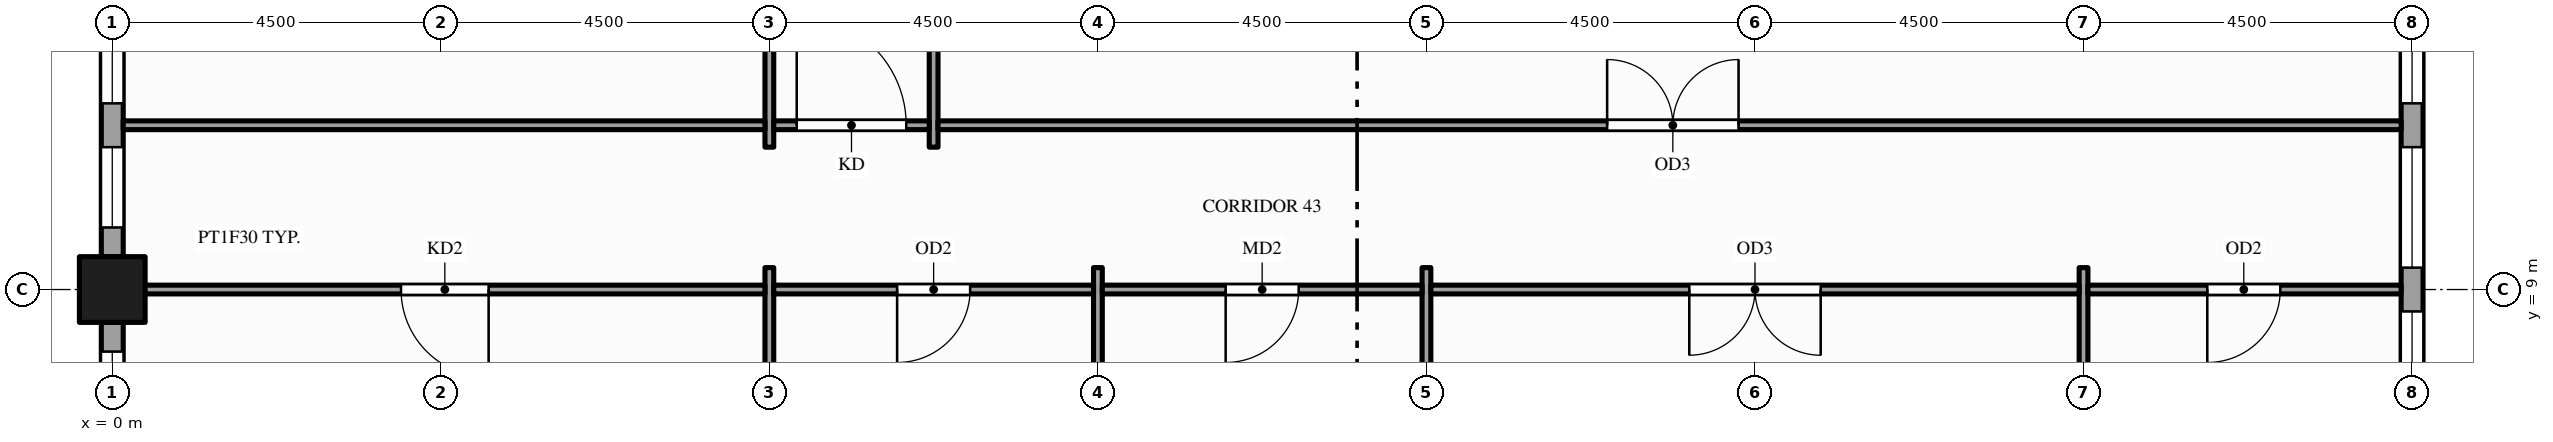
"""IFC4 building model, lengths in metres.
Left out: names, types, materials, properties, quantities, classifications, styles, units other than length and angle.
Written with IfcOpenShell. Run it as: python <this file> out.ifc"""

import sys

from ifc_helpers import new_model, si_unit, direction, frame, frame_2d, origin, origin_2d, place, context, subcontext, project, spatial, rectangle, hollow_rectangle, extrude, element, fill, save


model = new_model("IFC4")
c1 = context("Model", 3, precision=1e-05, world=origin(), true_north=direction((0.0, 1.0)))
c2 = subcontext(c1, "Body", "Model", "MODEL_VIEW")
j1 = project(units=[si_unit("LENGTHUNIT", "METRE"), si_unit("PLANEANGLEUNIT", "RADIAN")], contexts=[c1])
p1 = place(None, origin())
s1 = spatial("IfcSite", under=j1, at=p1, CompositionType="ELEMENT")
p2 = place(p1, origin())
s2 = spatial("IfcBuilding", under=s1, at=p2, CompositionType="ELEMENT")
p3 = place(p2, frame((0.0, 0.0, 139.0)))
s3 = spatial("IfcBuildingStorey", under=s2, at=p3, CompositionType="ELEMENT", Elevation=139.0)
p4 = place(p3, frame((0.0, 9.0, -0.15), z_axis=(0.0, 0.0, 1.0), x_axis=(1.0, 0.0, 0.0)))
e1 = element("IfcColumn", 1, at=p4, inside=s3, PredefinedType="COLUMN", context=c2, shape_type="SweptSolid", body=[
    extrude(hollow_rectangle(XDim=0.9, YDim=0.9, WallThickness=0.045, at=origin_2d()), origin(), (0.0, 0.0, 1.0), 4.0),
])
p5 = place(p3, frame((0.0, 13.05, 0.0), z_axis=(0.0, 0.0, 1.0), x_axis=(0.0, -1.0, 0.0)))
e2 = element("IfcWall", 2, at=p5, inside=s3, PredefinedType="STANDARD", context=c2, shape_type="SweptSolid", body=[
    extrude(rectangle(XDim=3.6, YDim=0.3, at=frame_2d((1.8, 0.0))), origin(), (0.0, 0.0, 1.0), 3.149),
])
p6 = place(p5, frame((0.4, 0.0, 0.9)))
e3 = element("IfcOpeningElement", 3, at=p6, cuts=e2, PredefinedType="OPENING", context=c2, shape_type="SweptSolid", body=[
    extrude(rectangle(XDim=1.1, YDim=2.0, at=frame_2d((0.55, 1.0))), frame((0.0, 0.16, 0.0), z_axis=(0.0, -1.0, 0.0), x_axis=(1.0, 0.0, 0.0)), (0.0, 0.0, 1.0), 0.32),
])
p7 = place(p5, frame((2.1, 0.0, 0.9)))
e4 = element("IfcOpeningElement", 4, at=p7, cuts=e2, PredefinedType="OPENING", context=c2, shape_type="SweptSolid", body=[
    extrude(rectangle(XDim=1.1, YDim=2.0, at=frame_2d((0.55, 1.0))), frame((0.0, 0.16, 0.0), z_axis=(0.0, -1.0, 0.0), x_axis=(1.0, 0.0, 0.0)), (0.0, 0.0, 1.0), 0.32),
])
p8 = place(p3, frame((0.0, 8.55, 0.0), z_axis=(0.0, 0.0, 1.0), x_axis=(0.0, -1.0, 0.0)))
e5 = element("IfcWall", 5, at=p8, inside=s3, PredefinedType="STANDARD", context=c2, shape_type="SweptSolid", body=[
    extrude(rectangle(XDim=3.6, YDim=0.3, at=frame_2d((1.8, 0.0))), origin(), (0.0, 0.0, 1.0), 3.149),
])
p9 = place(p8, frame((0.4, 0.0, 0.9)))
e6 = element("IfcOpeningElement", 6, at=p9, cuts=e5, PredefinedType="OPENING", context=c2, shape_type="SweptSolid", body=[
    extrude(rectangle(XDim=1.1, YDim=2.0, at=frame_2d((0.55, 1.0))), frame((0.0, 0.16, 0.0), z_axis=(0.0, -1.0, 0.0), x_axis=(1.0, 0.0, 0.0)), (0.0, 0.0, 1.0), 0.32),
])
p10 = place(p8, frame((2.1, 0.0, 0.9)))
e7 = element("IfcOpeningElement", 7, at=p10, cuts=e5, PredefinedType="OPENING", context=c2, shape_type="SweptSolid", body=[
    extrude(rectangle(XDim=1.1, YDim=2.0, at=frame_2d((0.55, 1.0))), frame((0.0, 0.16, 0.0), z_axis=(0.0, -1.0, 0.0), x_axis=(1.0, 0.0, 0.0)), (0.0, 0.0, 1.0), 0.32),
])
p11 = place(p3, frame((31.5, 1.95, 0.0), z_axis=(0.0, 0.0, 1.0), x_axis=(0.0, 1.0, 0.0)))
e8 = element("IfcWall", 8, at=p11, inside=s3, PredefinedType="STANDARD", context=c2, shape_type="SweptSolid", body=[
    extrude(rectangle(XDim=21.6, YDim=0.3, at=frame_2d((10.8, 0.0))), origin(), (0.0, 0.0, 1.0), 3.149),
])
p12 = place(p11, frame((0.6, 0.0, 0.9)))
e9 = element("IfcOpeningElement", 9, at=p12, cuts=e8, PredefinedType="OPENING", context=c2, shape_type="SweptSolid", body=[
    extrude(rectangle(XDim=1.65, YDim=2.0, at=frame_2d((0.825, 1.0))), frame((0.0, 0.16, 0.0), z_axis=(0.0, -1.0, 0.0), x_axis=(1.0, 0.0, 0.0)), (0.0, 0.0, 1.0), 0.32),
])
p13 = place(p11, frame((2.85, 0.0, 0.9)))
e10 = element("IfcOpeningElement", 10, at=p13, cuts=e8, PredefinedType="OPENING", context=c2, shape_type="SweptSolid", body=[
    extrude(rectangle(XDim=1.65, YDim=2.0, at=frame_2d((0.825, 1.0))), frame((0.0, 0.16, 0.0), z_axis=(0.0, -1.0, 0.0), x_axis=(1.0, 0.0, 0.0)), (0.0, 0.0, 1.0), 0.32),
])
p14 = place(p11, frame((5.1, 0.0, 0.9)))
e11 = element("IfcOpeningElement", 11, at=p14, cuts=e8, PredefinedType="OPENING", context=c2, shape_type="SweptSolid", body=[
    extrude(rectangle(XDim=1.65, YDim=2.0, at=frame_2d((0.825, 1.0))), frame((0.0, 0.16, 0.0), z_axis=(0.0, -1.0, 0.0), x_axis=(1.0, 0.0, 0.0)), (0.0, 0.0, 1.0), 0.32),
])
p15 = place(p11, frame((7.35, 0.0, 0.9)))
e12 = element("IfcOpeningElement", 12, at=p15, cuts=e8, PredefinedType="OPENING", context=c2, shape_type="SweptSolid", body=[
    extrude(rectangle(XDim=1.65, YDim=2.0, at=frame_2d((0.825, 1.0))), frame((0.0, 0.16, 0.0), z_axis=(0.0, -1.0, 0.0), x_axis=(1.0, 0.0, 0.0)), (0.0, 0.0, 1.0), 0.32),
])
p16 = place(p11, frame((9.6, 0.0, 0.9)))
e13 = element("IfcOpeningElement", 13, at=p16, cuts=e8, PredefinedType="OPENING", context=c2, shape_type="SweptSolid", body=[
    extrude(rectangle(XDim=1.65, YDim=2.0, at=frame_2d((0.825, 1.0))), frame((0.0, 0.16, 0.0), z_axis=(0.0, -1.0, 0.0), x_axis=(1.0, 0.0, 0.0)), (0.0, 0.0, 1.0), 0.32),
])
p17 = place(p11, frame((11.85, 0.0, 0.9)))
e14 = element("IfcOpeningElement", 14, at=p17, cuts=e8, PredefinedType="OPENING", context=c2, shape_type="SweptSolid", body=[
    extrude(rectangle(XDim=1.65, YDim=2.0, at=frame_2d((0.825, 1.0))), frame((0.0, 0.16, 0.0), z_axis=(0.0, -1.0, 0.0), x_axis=(1.0, 0.0, 0.0)), (0.0, 0.0, 1.0), 0.32),
])
p18 = place(p11, frame((14.1, 0.0, 0.9)))
e15 = element("IfcOpeningElement", 15, at=p18, cuts=e8, PredefinedType="OPENING", context=c2, shape_type="SweptSolid", body=[
    extrude(rectangle(XDim=1.65, YDim=2.0, at=frame_2d((0.825, 1.0))), frame((0.0, 0.16, 0.0), z_axis=(0.0, -1.0, 0.0), x_axis=(1.0, 0.0, 0.0)), (0.0, 0.0, 1.0), 0.32),
])
p19 = place(p11, frame((16.35, 0.0, 0.9)))
e16 = element("IfcOpeningElement", 16, at=p19, cuts=e8, PredefinedType="OPENING", context=c2, shape_type="SweptSolid", body=[
    extrude(rectangle(XDim=1.65, YDim=2.0, at=frame_2d((0.825, 1.0))), frame((0.0, 0.16, 0.0), z_axis=(0.0, -1.0, 0.0), x_axis=(1.0, 0.0, 0.0)), (0.0, 0.0, 1.0), 0.32),
])
p20 = place(p11, frame((18.6, 0.0, 0.9)))
e17 = element("IfcOpeningElement", 17, at=p20, cuts=e8, PredefinedType="OPENING", context=c2, shape_type="SweptSolid", body=[
    extrude(rectangle(XDim=1.65, YDim=2.0, at=frame_2d((0.825, 1.0))), frame((0.0, 0.16, 0.0), z_axis=(0.0, -1.0, 0.0), x_axis=(1.0, 0.0, 0.0)), (0.0, 0.0, 1.0), 0.32),
])
p21 = place(p3, frame((9.0, 3.875, 0.0), z_axis=(0.0, 0.0, 1.0), x_axis=(0.0, 1.0, 0.0)))
e18 = element("IfcWall", 18, at=p21, inside=s3, PredefinedType="PARTITIONING", context=c2, shape_type="SweptSolid", body=[
    extrude(rectangle(XDim=5.425, YDim=0.12, at=frame_2d((2.712, 0.0))), origin(), (0.0, 0.0, 1.0), 2.87),
])
p22 = place(p3, frame((9.0, 10.95, 0.0), z_axis=(0.0, 0.0, 1.0), x_axis=(0.0, 1.0, 0.0)))
e19 = element("IfcWall", 19, at=p22, inside=s3, PredefinedType="PARTITIONING", context=c2, shape_type="SweptSolid", body=[
    extrude(rectangle(XDim=20.85, YDim=0.12, at=frame_2d((10.425, 0.0))), origin(), (0.0, 0.0, 1.0), 2.6),
])
p23 = place(p22, frame((2.05, 0.0, 0.0)))
e20 = element("IfcOpeningElement", 20, at=p23, cuts=e19, PredefinedType="OPENING", context=c2, shape_type="SweptSolid", body=[
    extrude(rectangle(XDim=1.0, YDim=2.1, at=frame_2d((0.5, 1.05))), frame((0.0, 0.07, 0.0), z_axis=(0.0, -1.0, 0.0), x_axis=(1.0, 0.0, 0.0)), (0.0, 0.0, 1.0), 0.14),
])
p24 = place(p22, frame((6.55, 0.0, 0.0)))
e21 = element("IfcOpeningElement", 21, at=p24, cuts=e19, PredefinedType="OPENING", context=c2, shape_type="SweptSolid", body=[
    extrude(rectangle(XDim=1.0, YDim=2.1, at=frame_2d((0.5, 1.05))), frame((0.0, 0.07, 0.0), z_axis=(0.0, -1.0, 0.0), x_axis=(1.0, 0.0, 0.0)), (0.0, 0.0, 1.0), 0.14),
])
p25 = place(p22, frame((11.805, 0.0, 0.0)))
e22 = element("IfcOpeningElement", 22, at=p25, cuts=e19, PredefinedType="OPENING", context=c2, shape_type="SweptSolid", body=[
    extrude(rectangle(XDim=1.8, YDim=2.1, at=frame_2d((0.9, 1.05))), frame((0.0, 0.07, 0.0), z_axis=(0.0, -1.0, 0.0), x_axis=(1.0, 0.0, 0.0)), (0.0, 0.0, 1.0), 0.14),
])
p26 = place(p3, frame((11.25, 10.95, 0.0), z_axis=(0.0, 0.0, 1.0), x_axis=(0.0, 1.0, 0.0)))
e23 = element("IfcWall", 23, at=p26, inside=s3, PredefinedType="PARTITIONING", context=c2, shape_type="SweptSolid", body=[
    extrude(rectangle(XDim=20.85, YDim=0.12, at=frame_2d((10.425, 0.0))), origin(), (0.0, 0.0, 1.0), 2.6),
])
p27 = place(p26, frame((17.8, 0.0, 0.0)))
e24 = element("IfcOpeningElement", 24, at=p27, cuts=e23, PredefinedType="OPENING", context=c2, shape_type="SweptSolid", body=[
    extrude(rectangle(XDim=1.0, YDim=2.1, at=frame_2d((0.5, 1.05))), frame((0.0, 0.07, 0.0), z_axis=(0.0, -1.0, 0.0), x_axis=(1.0, 0.0, 0.0)), (0.0, 0.0, 1.0), 0.14),
])
p28 = place(p26, frame((4.2, 0.0, 0.0)))
e25 = element("IfcOpeningElement", 25, at=p28, cuts=e23, PredefinedType="OPENING", context=c2, shape_type="SweptSolid", body=[
    extrude(rectangle(XDim=1.2, YDim=2.1, at=frame_2d((0.6, 1.05))), frame((0.0, 0.07, 0.0), z_axis=(0.0, -1.0, 0.0), x_axis=(1.0, 0.0, 0.0)), (0.0, 0.0, 1.0), 0.14),
])
for number, where, z_axis, x_axis in (
    (26, (13.5, 0.15, 0.0), (0.0, 0.0, 1.0), (0.0, 1.0, 0.0)),
    (27, (18.0, 0.15, 0.0), (0.0, 0.0, 1.0), (0.0, 1.0, 0.0)),
):
    element("IfcWall", number, at=place(p3, frame(where, z_axis=z_axis, x_axis=x_axis)), inside=s3, PredefinedType="PARTITIONING", context=c2, shape_type="SweptSolid", body=[
        extrude(rectangle(XDim=9.15, YDim=0.12, at=frame_2d((4.575, 0.0))), origin(), (0.0, 0.0, 1.0), 2.87),
    ])
p29 = place(p3, frame((27.0, 1.65, 0.0), z_axis=(0.0, 0.0, 1.0), x_axis=(0.0, 1.0, 0.0)))
e28 = element("IfcWall", 28, at=p29, inside=s3, PredefinedType="PARTITIONING", context=c2, shape_type="SweptSolid", body=[
    extrude(rectangle(XDim=7.65, YDim=0.12, at=frame_2d((3.825, 0.0))), origin(), (0.0, 0.0, 1.0), 2.87),
])
p30 = place(p3, frame((0.15, 9.0, 0.0), z_axis=(0.0, 0.0, 1.0), x_axis=(1.0, 0.0, 0.0)))
e29 = element("IfcWall", 29, at=p30, inside=s3, PredefinedType="PARTITIONING", context=c2, shape_type="SweptSolid", body=[
    extrude(rectangle(XDim=8.79, YDim=0.12, at=frame_2d((4.395, 0.0))), origin(), (0.0, 0.0, 1.0), 2.87),
])
p31 = place(p30, frame((3.805, 0.0, 0.0)))
e30 = element("IfcOpeningElement", 30, at=p31, cuts=e29, PredefinedType="OPENING", context=c2, shape_type="SweptSolid", body=[
    extrude(rectangle(XDim=1.2, YDim=2.1, at=frame_2d((0.6, 1.05))), frame((0.0, 0.07, 0.0), z_axis=(0.0, -1.0, 0.0), x_axis=(1.0, 0.0, 0.0)), (0.0, 0.0, 1.0), 0.14),
])
p32 = place(p3, frame((9.06, 9.0, 0.0), z_axis=(0.0, 0.0, 1.0), x_axis=(1.0, 0.0, 0.0)))
e31 = element("IfcWall", 31, at=p32, inside=s3, PredefinedType="PARTITIONING", context=c2, shape_type="SweptSolid", body=[
    extrude(rectangle(XDim=4.38, YDim=0.12, at=frame_2d((2.19, 0.0))), origin(), (0.0, 0.0, 1.0), 2.87),
])
p33 = place(p32, frame((1.69, 0.0, 0.0)))
e32 = element("IfcOpeningElement", 32, at=p33, cuts=e31, PredefinedType="OPENING", context=c2, shape_type="SweptSolid", body=[
    extrude(rectangle(XDim=1.0, YDim=2.1, at=frame_2d((0.5, 1.05))), frame((0.0, 0.07, 0.0), z_axis=(0.0, -1.0, 0.0), x_axis=(1.0, 0.0, 0.0)), (0.0, 0.0, 1.0), 0.14),
])
p34 = place(p3, frame((13.56, 9.0, 0.0), z_axis=(0.0, 0.0, 1.0), x_axis=(1.0, 0.0, 0.0)))
e33 = element("IfcWall", 33, at=p34, inside=s3, PredefinedType="PARTITIONING", context=c2, shape_type="SweptSolid", body=[
    extrude(rectangle(XDim=4.38, YDim=0.12, at=frame_2d((2.19, 0.0))), origin(), (0.0, 0.0, 1.0), 2.87),
])
p35 = place(p34, frame((1.69, 0.0, 0.0)))
e34 = element("IfcOpeningElement", 34, at=p35, cuts=e33, PredefinedType="OPENING", context=c2, shape_type="SweptSolid", body=[
    extrude(rectangle(XDim=1.0, YDim=2.1, at=frame_2d((0.5, 1.05))), frame((0.0, 0.07, 0.0), z_axis=(0.0, -1.0, 0.0), x_axis=(1.0, 0.0, 0.0)), (0.0, 0.0, 1.0), 0.14),
])
p36 = place(p3, frame((18.06, 9.0, 0.0), z_axis=(0.0, 0.0, 1.0), x_axis=(1.0, 0.0, 0.0)))
e35 = element("IfcWall", 35, at=p36, inside=s3, PredefinedType="PARTITIONING", context=c2, shape_type="SweptSolid", body=[
    extrude(rectangle(XDim=8.88, YDim=0.12, at=frame_2d((4.44, 0.0))), origin(), (0.0, 0.0, 1.0), 2.87),
])
p37 = place(p36, frame((3.54, 0.0, 0.0)))
e36 = element("IfcOpeningElement", 36, at=p37, cuts=e35, PredefinedType="OPENING", context=c2, shape_type="SweptSolid", body=[
    extrude(rectangle(XDim=1.8, YDim=2.1, at=frame_2d((0.9, 1.05))), frame((0.0, 0.07, 0.0), z_axis=(0.0, -1.0, 0.0), x_axis=(1.0, 0.0, 0.0)), (0.0, 0.0, 1.0), 0.14),
])
p38 = place(p3, frame((27.06, 9.0, 0.0), z_axis=(0.0, 0.0, 1.0), x_axis=(1.0, 0.0, 0.0)))
e37 = element("IfcWall", 37, at=p38, inside=s3, PredefinedType="PARTITIONING", context=c2, shape_type="SweptSolid", body=[
    extrude(rectangle(XDim=4.29, YDim=0.12, at=frame_2d((2.145, 0.0))), origin(), (0.0, 0.0, 1.0), 2.87),
])
p39 = place(p38, frame((1.635, 0.0, 0.0)))
e38 = element("IfcOpeningElement", 38, at=p39, cuts=e37, PredefinedType="OPENING", context=c2, shape_type="SweptSolid", body=[
    extrude(rectangle(XDim=1.0, YDim=2.1, at=frame_2d((0.5, 1.05))), frame((0.0, 0.07, 0.0), z_axis=(0.0, -1.0, 0.0), x_axis=(1.0, 0.0, 0.0)), (0.0, 0.0, 1.0), 0.14),
])
p40 = place(p3, frame((0.15, 11.25, 0.0), z_axis=(0.0, 0.0, 1.0), x_axis=(1.0, 0.0, 0.0)))
e39 = element("IfcWall", 39, at=p40, inside=s3, PredefinedType="PARTITIONING", context=c2, shape_type="SweptSolid", body=[
    extrude(rectangle(XDim=8.79, YDim=0.12, at=frame_2d((4.395, 0.0))), origin(), (0.0, 0.0, 1.0), 2.87),
])
p41 = place(p3, frame((9.06, 11.25, 0.0), z_axis=(0.0, 0.0, 1.0), x_axis=(1.0, 0.0, 0.0)))
e40 = element("IfcWall", 40, at=p41, inside=s3, PredefinedType="PARTITIONING", context=c2, shape_type="SweptSolid", body=[
    extrude(rectangle(XDim=2.13, YDim=0.12, at=frame_2d((1.065, 0.0))), origin(), (0.0, 0.0, 1.0), 2.87),
])
p42 = place(p41, frame((0.315, 0.0, 0.0)))
e41 = element("IfcOpeningElement", 41, at=p42, cuts=e40, PredefinedType="OPENING", context=c2, shape_type="SweptSolid", body=[
    extrude(rectangle(XDim=1.5, YDim=2.1, at=frame_2d((0.75, 1.05))), frame((0.0, 0.07, 0.0), z_axis=(0.0, -1.0, 0.0), x_axis=(1.0, 0.0, 0.0)), (0.0, 0.0, 1.0), 0.14),
])
p43 = place(p3, frame((11.31, 11.25, 0.0), z_axis=(0.0, 0.0, 1.0), x_axis=(1.0, 0.0, 0.0)))
e42 = element("IfcWall", 42, at=p43, inside=s3, PredefinedType="PARTITIONING", context=c2, shape_type="SweptSolid", body=[
    extrude(rectangle(XDim=20.04, YDim=0.12, at=frame_2d((10.02, 0.0))), origin(), (0.0, 0.0, 1.0), 2.87),
])
p44 = place(p43, frame((9.165, 0.0, 0.0)))
e43 = element("IfcOpeningElement", 43, at=p44, cuts=e42, PredefinedType="OPENING", context=c2, shape_type="SweptSolid", body=[
    extrude(rectangle(XDim=1.8, YDim=2.1, at=frame_2d((0.9, 1.05))), frame((0.0, 0.07, 0.0), z_axis=(0.0, -1.0, 0.0), x_axis=(1.0, 0.0, 0.0)), (0.0, 0.0, 1.0), 0.14),
])
p45 = place(p6, origin())
e44 = element("IfcWindow", 44, at=p45, inside=s3, PartitioningType="SINGLE_PANEL", PredefinedType="WINDOW", context=c2, shape_type="SweptSolid", body=[
    extrude(rectangle(XDim=1.1, YDim=2.0, at=frame_2d((0.55, 1.0))), frame((0.0, 0.03, 0.0), z_axis=(0.0, -1.0, 0.0), x_axis=(1.0, 0.0, 0.0)), (0.0, 0.0, 1.0), 0.06),
])
fill(e3, e44)
p46 = place(p7, origin())
e45 = element("IfcWindow", 45, at=p46, inside=s3, PartitioningType="SINGLE_PANEL", PredefinedType="WINDOW", context=c2, shape_type="SweptSolid", body=[
    extrude(rectangle(XDim=1.1, YDim=2.0, at=frame_2d((0.55, 1.0))), frame((0.0, 0.03, 0.0), z_axis=(0.0, -1.0, 0.0), x_axis=(1.0, 0.0, 0.0)), (0.0, 0.0, 1.0), 0.06),
])
fill(e4, e45)
p47 = place(p9, origin())
e46 = element("IfcWindow", 46, at=p47, inside=s3, PartitioningType="SINGLE_PANEL", PredefinedType="WINDOW", context=c2, shape_type="SweptSolid", body=[
    extrude(rectangle(XDim=1.1, YDim=2.0, at=frame_2d((0.55, 1.0))), frame((0.0, 0.03, 0.0), z_axis=(0.0, -1.0, 0.0), x_axis=(1.0, 0.0, 0.0)), (0.0, 0.0, 1.0), 0.06),
])
fill(e6, e46)
p48 = place(p14, origin())
e47 = element("IfcWindow", 47, at=p48, inside=s3, PartitioningType="SINGLE_PANEL", PredefinedType="WINDOW", context=c2, shape_type="SweptSolid", body=[
    extrude(rectangle(XDim=1.65, YDim=2.0, at=frame_2d((0.825, 1.0))), frame((0.0, 0.03, 0.0), z_axis=(0.0, -1.0, 0.0), x_axis=(1.0, 0.0, 0.0)), (0.0, 0.0, 1.0), 0.06),
])
fill(e11, e47)
p49 = place(p15, origin())
e48 = element("IfcWindow", 48, at=p49, inside=s3, PartitioningType="SINGLE_PANEL", PredefinedType="WINDOW", context=c2, shape_type="SweptSolid", body=[
    extrude(rectangle(XDim=1.65, YDim=2.0, at=frame_2d((0.825, 1.0))), frame((0.0, 0.03, 0.0), z_axis=(0.0, -1.0, 0.0), x_axis=(1.0, 0.0, 0.0)), (0.0, 0.0, 1.0), 0.06),
])
fill(e12, e48)
p50 = place(p16, origin())
e49 = element("IfcWindow", 49, at=p50, inside=s3, PartitioningType="SINGLE_PANEL", PredefinedType="WINDOW", context=c2, shape_type="SweptSolid", body=[
    extrude(rectangle(XDim=1.65, YDim=2.0, at=frame_2d((0.825, 1.0))), frame((0.0, 0.03, 0.0), z_axis=(0.0, -1.0, 0.0), x_axis=(1.0, 0.0, 0.0)), (0.0, 0.0, 1.0), 0.06),
])
fill(e13, e49)
p51 = place(p31, origin())
e50 = element("IfcDoor", 50, at=p51, inside=s3, OperationType="SINGLE_SWING_RIGHT", PredefinedType="DOOR", context=c2, shape_type="SweptSolid", body=[
    extrude(rectangle(XDim=1.2, YDim=2.1, at=frame_2d((0.6, 1.05))), frame((0.0, 0.025, 0.0), z_axis=(0.0, -1.0, 0.0), x_axis=(1.0, 0.0, 0.0)), (0.0, 0.0, 1.0), 0.05),
])
fill(e30, e50)
p52 = place(p33, origin())
e51 = element("IfcDoor", 51, at=p52, inside=s3, OperationType="SINGLE_SWING_LEFT", PredefinedType="DOOR", context=c2, shape_type="SweptSolid", body=[
    extrude(rectangle(XDim=1.0, YDim=2.1, at=frame_2d((0.5, 1.05))), frame((0.0, 0.025, 0.0), z_axis=(0.0, -1.0, 0.0), x_axis=(1.0, 0.0, 0.0)), (0.0, 0.0, 1.0), 0.05),
])
fill(e32, e51)
p53 = place(p35, origin())
e52 = element("IfcDoor", 52, at=p53, inside=s3, OperationType="SINGLE_SWING_LEFT", PredefinedType="DOOR", context=c2, shape_type="SweptSolid", body=[
    extrude(rectangle(XDim=1.0, YDim=2.1, at=frame_2d((0.5, 1.05))), frame((0.0, 0.025, 0.0), z_axis=(0.0, -1.0, 0.0), x_axis=(1.0, 0.0, 0.0)), (0.0, 0.0, 1.0), 0.05),
])
fill(e34, e52)
p54 = place(p37, origin())
e53 = element("IfcDoor", 53, at=p54, inside=s3, OperationType="DOUBLE_DOOR_SINGLE_SWING", PredefinedType="DOOR", context=c2, shape_type="SweptSolid", body=[
    extrude(rectangle(XDim=1.8, YDim=2.1, at=frame_2d((0.9, 1.05))), frame((0.0, 0.025, 0.0), z_axis=(0.0, -1.0, 0.0), x_axis=(1.0, 0.0, 0.0)), (0.0, 0.0, 1.0), 0.05),
])
fill(e36, e53)
p55 = place(p39, origin())
e54 = element("IfcDoor", 54, at=p55, inside=s3, OperationType="SINGLE_SWING_LEFT", PredefinedType="DOOR", context=c2, shape_type="SweptSolid", body=[
    extrude(rectangle(XDim=1.0, YDim=2.1, at=frame_2d((0.5, 1.05))), frame((0.0, 0.025, 0.0), z_axis=(0.0, -1.0, 0.0), x_axis=(1.0, 0.0, 0.0)), (0.0, 0.0, 1.0), 0.05),
])
fill(e38, e54)
p56 = place(p44, origin())
e55 = element("IfcDoor", 55, at=p56, inside=s3, OperationType="DOUBLE_DOOR_SINGLE_SWING", PredefinedType="DOOR", context=c2, shape_type="SweptSolid", body=[
    extrude(rectangle(XDim=1.8, YDim=2.1, at=frame_2d((0.9, 1.05))), frame((0.0, 0.025, 0.0), z_axis=(0.0, -1.0, 0.0), x_axis=(1.0, 0.0, 0.0)), (0.0, 0.0, 1.0), 0.05),
])
fill(e43, e55)
p57 = place(p42, origin())
e56 = element("IfcDoor", 56, at=p57, inside=s3, OperationType="SINGLE_SWING_LEFT", PredefinedType="DOOR", context=c2, shape_type="SweptSolid", body=[
    extrude(rectangle(XDim=1.5, YDim=2.1, at=frame_2d((0.75, 1.05))), frame((0.0, 0.025, 0.0), z_axis=(0.0, -1.0, 0.0), x_axis=(1.0, 0.0, 0.0)), (0.0, 0.0, 1.0), 0.05),
])
fill(e41, e56)
save(model, sys.argv[1])
